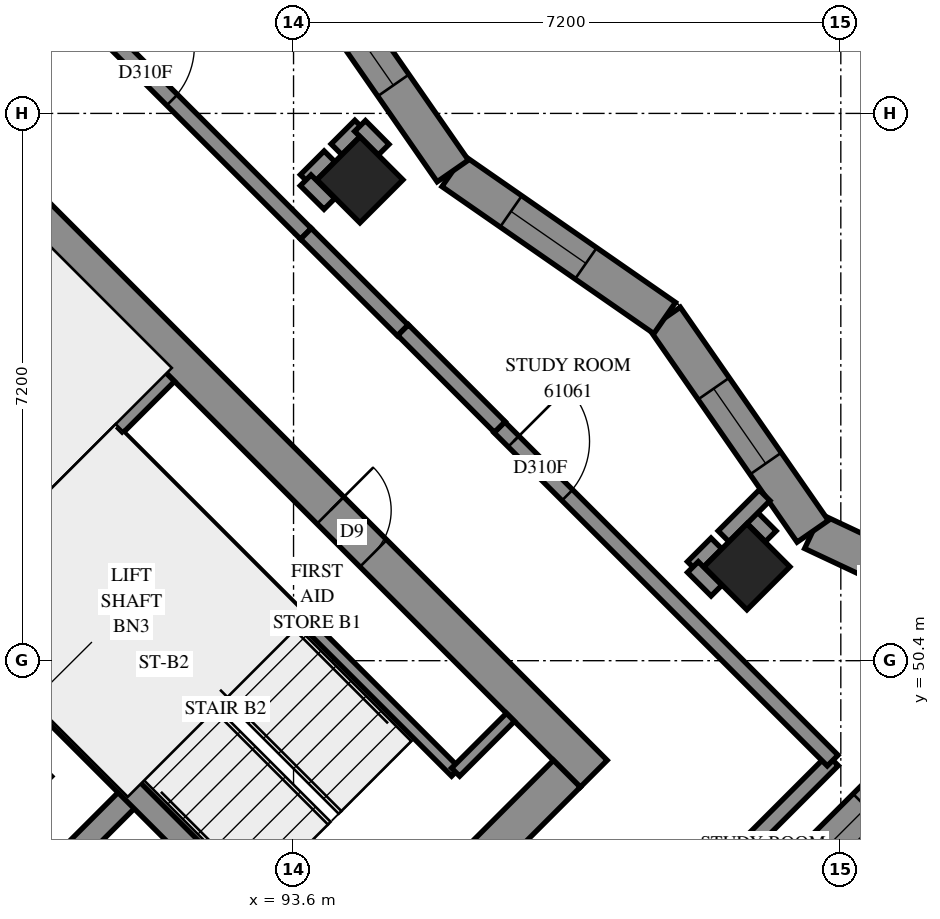
"""IFC4 building model, lengths in metres.
Left out: names, types, materials, properties, quantities, classifications, styles, units other than length and angle.
Written with IfcOpenShell. Run it as: python <this file> out.ifc"""

import sys

from ifc_helpers import new_model, si_unit, direction, frame, frame_2d, origin, origin_2d, place, context, subcontext, project, spatial, polyline, rectangle, outline, extrude, element, fill, save


model = new_model("IFC4")
c1 = context("Model", 3, precision=1e-05, world=origin(), true_north=direction((0.0, 1.0)))
c2 = subcontext(c1, "Body", "Model", "MODEL_VIEW")
j1 = project(units=[si_unit("LENGTHUNIT", "METRE"), si_unit("PLANEANGLEUNIT", "RADIAN")], contexts=[c1])
p1 = place(None, origin())
s1 = spatial("IfcSite", under=j1, at=p1, CompositionType="ELEMENT")
p2 = place(p1, origin())
s2 = spatial("IfcBuilding", under=s1, at=p2, CompositionType="ELEMENT")
p3 = place(p2, frame((0.0, 0.0, 223.6)))
s3 = spatial("IfcBuildingStorey", under=s2, at=p3, CompositionType="ELEMENT", Elevation=223.6)
for number, where, z_axis, x_axis in (
    (1, (94.474, 56.727, 0.0), (0.0, 0.0, 1.0), (0.707, -0.707, 0.0)),
    (2, (99.565, 51.635, 0.0), (0.0, 0.0, 1.0), (0.707, -0.707, 0.0)),
):
    element("IfcColumn", number, at=place(p3, frame(where, z_axis=z_axis, x_axis=x_axis)), inside=s3, PredefinedType="COLUMN", context=c2, shape_type="SweptSolid", body=[
        extrude(rectangle(XDim=0.8, YDim=0.8, at=origin_2d()), origin(), (0.0, 0.0, 1.0), 3.1),
    ])
p4 = place(p3, frame((86.66, 59.802, -0.3), z_axis=(0.0, 0.0, 1.0), x_axis=(0.7071067812, -0.7071067812, 0.0)))
e3 = element("IfcWall", 3, at=p4, inside=s3, PredefinedType="SHEAR", context=c2, shape_type="SweptSolid", body=[
    extrude(rectangle(XDim=15.4, YDim=0.5, at=frame_2d((7.7, 0.0))), origin(), (0.0, 0.0, 1.0), 2.7),
])
p5 = place(p4, frame((10.5, 0.0, 0.3)))
e4 = element("IfcOpeningElement", 4, at=p5, cuts=e3, PredefinedType="OPENING", context=c2, shape_type="SweptSolid", body=[
    extrude(rectangle(XDim=0.8, YDim=2.1, at=frame_2d((0.4, 1.05))), frame((0.0, 0.26, 0.0), z_axis=(0.0, -1.0, 0.0), x_axis=(1.0, 0.0, 0.0)), (0.0, 0.0, 1.0), 0.52),
])
p6 = place(p3, frame((87.013, 38.731, -0.3), z_axis=(0.0, 0.0, 1.0), x_axis=(0.7071067812, 0.7071067812, 0.0)))
e5 = element("IfcWall", 5, at=p6, inside=s3, PredefinedType="SHEAR", context=c2, shape_type="SweptSolid", body=[
    extrude(rectangle(XDim=14.4, YDim=0.5, at=frame_2d((7.2, 0.0))), origin(), (0.0, 0.0, 1.0), 2.7),
])
p7 = place(p6, frame((4.55, 0.0, 0.3)))
e6 = element("IfcOpeningElement", 6, at=p7, cuts=e5, PredefinedType="OPENING", context=c2, shape_type="SweptSolid", body=[
    extrude(rectangle(XDim=1.1, YDim=2.1, at=frame_2d((0.55, 1.05))), frame((0.0, 0.26, 0.0), z_axis=(0.0, -1.0, 0.0), x_axis=(1.0, 0.0, 0.0)), (0.0, 0.0, 1.0), 0.52),
])
p8 = place(p6, frame((11.35, 0.0, 0.3)))
e7 = element("IfcOpeningElement", 7, at=p8, cuts=e5, PredefinedType="OPENING", context=c2, shape_type="SweptSolid", body=[
    extrude(rectangle(XDim=1.1, YDim=2.1, at=frame_2d((0.55, 1.05))), frame((0.0, 0.26, 0.0), z_axis=(0.0, -1.0, 0.0), x_axis=(1.0, 0.0, 0.0)), (0.0, 0.0, 1.0), 0.52),
])
p9 = place(p3, frame((89.17, 46.332, 0.0), z_axis=(0.0, 0.0, 1.0), x_axis=(0.7071067812, 0.7071067812, 0.0)))
e8 = element("IfcWall", 8, at=p9, inside=s3, PredefinedType="SOLIDWALL", context=c2, shape_type="SweptSolid", body=[
    extrude(rectangle(XDim=3.3, YDim=0.3, at=frame_2d((1.65, 0.0))), origin(), (0.0, 0.0, 1.0), 3.1),
])
p10 = place(p3, frame((81.534, 53.969, 0.0), z_axis=(0.0, 0.0, 1.0), x_axis=(0.707103309, -0.7071102534, 0.0)))
e9 = element("IfcWall", 9, at=p10, inside=s3, PredefinedType="SOLIDWALL", context=c2, shape_type="SweptSolid", body=[
    extrude(rectangle(XDim=14.4, YDim=0.3, at=frame_2d((7.2, 0.0))), origin(), (0.0, 0.0, 1.0), 3.1),
])
p11 = place(p10, frame((1.25, 0.0, 0.0)))
e10 = element("IfcOpeningElement", 10, at=p11, cuts=e9, PredefinedType="OPENING", context=c2, shape_type="SweptSolid", body=[
    extrude(rectangle(XDim=1.1, YDim=2.1, at=frame_2d((0.55, 1.05))), frame((0.0, 0.16, 0.0), z_axis=(0.0, -1.0, 0.0), x_axis=(1.0, 0.0, 0.0)), (0.0, 0.0, 1.0), 0.32),
])
p12 = place(p10, frame((4.85, 0.0, 0.0)))
e11 = element("IfcOpeningElement", 11, at=p12, cuts=e9, PredefinedType="OPENING", context=c2, shape_type="SweptSolid", body=[
    extrude(rectangle(XDim=1.1, YDim=2.1, at=frame_2d((0.55, 1.05))), frame((0.0, 0.16, 0.0), z_axis=(0.0, -1.0, 0.0), x_axis=(1.0, 0.0, 0.0)), (0.0, 0.0, 1.0), 0.32),
])
p13 = place(p10, frame((8.45, 0.0, 0.0)))
e12 = element("IfcOpeningElement", 12, at=p13, cuts=e9, PredefinedType="OPENING", context=c2, shape_type="SweptSolid", body=[
    extrude(rectangle(XDim=1.1, YDim=2.1, at=frame_2d((0.55, 1.05))), frame((0.0, 0.16, 0.0), z_axis=(0.0, -1.0, 0.0), x_axis=(1.0, 0.0, 0.0)), (0.0, 0.0, 1.0), 0.32),
])
p14 = place(p10, frame((12.05, 0.0, 0.0)))
e13 = element("IfcOpeningElement", 13, at=p14, cuts=e9, PredefinedType="OPENING", context=c2, shape_type="SweptSolid", body=[
    extrude(rectangle(XDim=1.1, YDim=2.1, at=frame_2d((0.55, 1.05))), frame((0.0, 0.16, 0.0), z_axis=(0.0, -1.0, 0.0), x_axis=(1.0, 0.0, 0.0)), (0.0, 0.0, 1.0), 0.32),
])
p15 = place(p3, frame((88.958, 51.211, 0.0), z_axis=(0.0, 0.0, 1.0), x_axis=(0.7070998367, -0.7071137256, 0.0)))
e14 = element("IfcWall", 14, at=p15, inside=s3, PredefinedType="SOLIDWALL", context=c2, shape_type="SweptSolid", body=[
    extrude(rectangle(XDim=7.2, YDim=0.3, at=frame_2d((3.6, 0.0))), origin(), (0.0, 0.0, 1.0), 3.1),
])
p16 = place(p3, frame((88.958, 51.211, 0.0), z_axis=(0.0, 0.0, 1.0), x_axis=(0.7071067812, 0.7071067812, 0.0)))
e15 = element("IfcWall", 15, at=p16, inside=s3, PredefinedType="SOLIDWALL", context=c2, shape_type="SweptSolid", body=[
    extrude(rectangle(XDim=4.2, YDim=0.3, at=frame_2d((2.1, 0.0))), origin(), (0.0, 0.0, 1.0), 3.1),
])
p17 = place(p3, frame((99.211, 46.544, 0.0), z_axis=(0.0, 0.0, 1.0), x_axis=(0.7071152597, 0.7070983025, 0.0)))
e16 = element("IfcWall", 16, at=p17, inside=s3, PredefinedType="SOLIDWALL", context=c2, shape_type="SweptSolid", body=[
    extrude(outline(polyline([(0.25, -0.25), (6.253, -0.25), (5.541, 0.25), (-0.25, 0.25), (0.25, -0.25)])), origin(), (0.0, 0.0, 1.0), 3.1),
])
p18 = place(p17, frame((0.925, 0.0, 0.6)))
e17 = element("IfcOpeningElement", 17, at=p18, cuts=e16, PredefinedType="OPENING", context=c2, shape_type="SweptSolid", body=[
    extrude(rectangle(XDim=1.8, YDim=1.9, at=frame_2d((0.9, 0.95))), frame((0.0, 0.26, 0.0), z_axis=(0.0, -1.0, 0.0), x_axis=(1.0, 0.0, 0.0)), (0.0, 0.0, 1.0), 0.52),
])
p19 = place(p17, frame((3.996, 0.0, 0.6)))
e18 = element("IfcOpeningElement", 18, at=p19, cuts=e16, PredefinedType="OPENING", context=c2, shape_type="SweptSolid", body=[
    extrude(rectangle(XDim=1.2, YDim=1.9, at=frame_2d((0.6, 0.95))), frame((0.0, 0.26, 0.0), z_axis=(0.0, -1.0, 0.0), x_axis=(1.0, 0.0, 0.0)), (0.0, 0.0, 1.0), 0.52),
])
p20 = place(p3, frame((103.381, 50.714, 0.0), z_axis=(0.0, 0.0, 1.0), x_axis=(-0.9049027781, 0.4256183292, 0.0)))
e19 = element("IfcWall", 19, at=p20, inside=s3, PredefinedType="SOLIDWALL", context=c2, shape_type="SweptSolid", body=[
    extrude(outline(polyline([(-0.356, -0.25), (3.194, -0.25), (3.328, 0.25), (0.356, 0.25), (-0.356, -0.25)])), origin(), (0.0, 0.0, 1.0), 3.1),
])
p21 = place(p20, frame((1.208, 0.0, 0.45)))
e20 = element("IfcOpeningElement", 20, at=p21, cuts=e19, PredefinedType="OPENING", context=c2, shape_type="SweptSolid", body=[
    extrude(rectangle(XDim=1.2, YDim=2.5, at=frame_2d((0.6, 1.25))), frame((0.0, 0.26, 0.0), z_axis=(0.0, -1.0, 0.0), x_axis=(1.0, 0.0, 0.0)), (0.0, 0.0, 1.0), 0.52),
])
p22 = place(p3, frame((100.43, 52.102, 0.0), z_axis=(0.0, 0.0, 1.0), x_axis=(-0.5702097962, 0.8214991103, 0.0)))
e21 = element("IfcWall", 21, at=p22, inside=s3, PredefinedType="SOLIDWALL", context=c2, shape_type="SweptSolid", body=[
    extrude(outline(polyline([(0.067, -0.25), (3.461, -0.25), (3.37, 0.25), (-0.067, 0.25), (0.067, -0.25)])), origin(), (0.0, 0.0, 1.0), 3.1),
])
p23 = place(p22, frame((1.085, 0.0, 0.45)))
e22 = element("IfcOpeningElement", 22, at=p23, cuts=e21, PredefinedType="OPENING", context=c2, shape_type="SweptSolid", body=[
    extrude(rectangle(XDim=1.2, YDim=2.5, at=frame_2d((0.6, 1.25))), frame((0.0, 0.26, 0.0), z_axis=(0.0, -1.0, 0.0), x_axis=(1.0, 0.0, 0.0)), (0.0, 0.0, 1.0), 0.52),
])
p24 = place(p3, frame((98.483, 54.908, 0.0), z_axis=(0.0, 0.0, 1.0), x_axis=(-0.8215041665, 0.5702025117, 0.0)))
e23 = element("IfcWall", 23, at=p24, inside=s3, PredefinedType="SOLIDWALL", context=c2, shape_type="SweptSolid", body=[
    extrude(outline(polyline([(-0.045, -0.25), (3.348, -0.25), (3.439, 0.25), (0.045, 0.25), (-0.045, -0.25)])), origin(), (0.0, 0.0, 1.0), 3.1),
])
p25 = place(p24, frame((1.261, 0.0, 0.45)))
e24 = element("IfcOpeningElement", 24, at=p25, cuts=e23, PredefinedType="OPENING", context=c2, shape_type="SweptSolid", body=[
    extrude(rectangle(XDim=1.2, YDim=2.5, at=frame_2d((0.6, 1.25))), frame((0.0, 0.26, 0.0), z_axis=(0.0, -1.0, 0.0), x_axis=(1.0, 0.0, 0.0)), (0.0, 0.0, 1.0), 0.52),
])
p26 = place(p3, frame((95.695, 56.843, 0.0), z_axis=(0.0, 0.0, 1.0), x_axis=(-0.5702025117, 0.8215041665, 0.0)))
e25 = element("IfcWall", 25, at=p26, inside=s3, PredefinedType="SOLIDWALL", context=c2, shape_type="SweptSolid", body=[
    extrude(outline(polyline([(0.045, -0.25), (3.439, -0.25), (3.348, 0.25), (-0.045, 0.25), (0.045, -0.25)])), origin(), (0.0, 0.0, 1.0), 3.1),
])
p27 = place(p26, frame((1.371, 0.0, 0.45)))
e26 = element("IfcOpeningElement", 26, at=p27, cuts=e25, PredefinedType="OPENING", context=c2, shape_type="SweptSolid", body=[
    extrude(rectangle(XDim=1.2, YDim=2.5, at=frame_2d((0.6, 1.25))), frame((0.0, 0.26, 0.0), z_axis=(0.0, -1.0, 0.0), x_axis=(1.0, 0.0, 0.0)), (0.0, 0.0, 1.0), 0.52),
])
p28 = place(p3, frame((91.313, 53.354, 0.0), z_axis=(0.0, 0.0, 1.0), x_axis=(0.7071147811, -0.7070987812, 0.0)))
e27 = element("IfcWall", 27, at=p28, inside=s3, PredefinedType="PARTITIONING", context=c2, shape_type="SweptSolid", body=[
    extrude(rectangle(XDim=6.25, YDim=0.15, at=frame_2d((3.125, 0.0))), origin(), (0.0, 0.0, 1.0), 3.1),
])
p29 = place(p3, frame((95.732, 48.934, 0.0), z_axis=(0.0, 0.0, 1.0), x_axis=(0.7071067812, 0.7071067812, 0.0)))
e28 = element("IfcWall", 28, at=p29, inside=s3, PredefinedType="PARTITIONING", context=c2, shape_type="SweptSolid", body=[
    extrude(rectangle(XDim=1.02, YDim=0.15, at=frame_2d((0.51, 0.0))), origin(), (0.0, 0.0, 1.0), 3.1),
])
p30 = place(p3, frame((93.625, 42.021, 0.0), z_axis=(0.0, 0.0, 1.0), x_axis=(0.7071067812, 0.7071067812, 0.0)))
e29 = element("IfcWall", 29, at=p30, inside=s3, PredefinedType="PARTITIONING", context=c2, shape_type="SweptSolid", body=[
    extrude(rectangle(XDim=9.998, YDim=0.2, at=frame_2d((4.999, 0.0))), origin(), (0.0, 0.0, 1.0), 3.1),
])
p31 = place(p30, frame((0.248, 0.0, 0.0)))
e30 = element("IfcOpeningElement", 30, at=p31, cuts=e29, PredefinedType="OPENING", context=c2, shape_type="SweptSolid", body=[
    extrude(rectangle(XDim=1.0, YDim=2.1, at=frame_2d((0.5, 1.05))), frame((0.0, 0.11, 0.0), z_axis=(0.0, -1.0, 0.0), x_axis=(1.0, 0.0, 0.0)), (0.0, 0.0, 1.0), 0.22),
])
p32 = place(p3, frame((86.835, 62.945, 0.0), z_axis=(0.0, 0.0, 1.0), x_axis=(0.7071067812, -0.7071067812, 0.0)))
e31 = element("IfcWall", 31, at=p32, inside=s3, PredefinedType="PARTITIONING", context=c2, shape_type="SweptSolid", body=[
    extrude(rectangle(XDim=9.798, YDim=0.2, at=frame_2d((4.899, 0.0))), origin(), (0.0, 0.0, 1.0), 3.1),
])
p33 = place(p32, frame((6.308, 0.0, 0.0)))
e32 = element("IfcOpeningElement", 32, at=p33, cuts=e31, PredefinedType="OPENING", context=c2, shape_type="SweptSolid", body=[
    extrude(rectangle(XDim=1.0, YDim=2.1, at=frame_2d((0.5, 1.05))), frame((0.0, 0.11, 0.0), z_axis=(0.0, -1.0, 0.0), x_axis=(1.0, 0.0, 0.0)), (0.0, 0.0, 1.0), 0.22),
])
p34 = place(p3, frame((96.309, 53.471, 0.0), z_axis=(0.0, 0.0, 1.0), x_axis=(0.7071067812, -0.7071067812, 0.0)))
e33 = element("IfcWall", 33, at=p34, inside=s3, PredefinedType="PARTITIONING", context=c2, shape_type="SweptSolid", body=[
    extrude(rectangle(XDim=6.2, YDim=0.2, at=frame_2d((3.1, 0.0))), origin(), (0.0, 0.0, 1.0), 3.1),
])
p35 = place(p34, frame((0.263, 0.0, 0.0)))
e34 = element("IfcOpeningElement", 34, at=p35, cuts=e33, PredefinedType="OPENING", context=c2, shape_type="SweptSolid", body=[
    extrude(rectangle(XDim=1.0, YDim=2.1, at=frame_2d((0.5, 1.05))), frame((0.0, 0.11, 0.0), z_axis=(0.0, -1.0, 0.0), x_axis=(1.0, 0.0, 0.0)), (0.0, 0.0, 1.0), 0.22),
])
for number, where, z_axis, x_axis in (
    (35, (93.763, 56.017, 0.0), (0.0, 0.0, 1.0), (0.708, -0.707, 0.0)),
    (36, (95.041, 54.749, 0.0), (0.0, 0.0, 1.0), (0.707, -0.708, 0.0)),
):
    element("IfcWall", number, at=place(p3, frame(where, z_axis=z_axis, x_axis=x_axis)), inside=s3, PredefinedType="PARTITIONING", context=c2, shape_type="SweptSolid", body=[
        extrude(rectangle(XDim=1.8, YDim=0.2, at=frame_2d((0.9, 0.0))), origin(), (0.0, 0.0, 1.0), 3.1),
    ])
for number, where, z_axis, x_axis in (
    (37, (93.761, 56.723, 0.0), (0.0, 0.0, 1.0), (0.707, 0.707, 0.0)),
    (38, (94.165, 57.127, 0.0), (0.0, 0.0, 1.0), (0.707, 0.707, 0.0)),
):
    element("IfcWall", number, at=place(p3, frame(where, z_axis=z_axis, x_axis=x_axis)), inside=s3, PredefinedType="PARTITIONING", context=c2, shape_type="SweptSolid", body=[
        extrude(rectangle(XDim=0.441, YDim=0.2, at=frame_2d((0.221, 0.0))), origin(), (0.0, 0.0, 1.0), 3.1),
    ])
for number, where, z_axis, x_axis in (
    (39, (94.475, 57.435, 0.0), (0.0, 0.0, 1.0), (0.705, -0.709, 0.0)),
    (40, (93.76, 56.719, 0.0), (0.0, 0.0, 1.0), (0.709, -0.705, 0.0)),
):
    element("IfcWall", number, at=place(p3, frame(where, z_axis=z_axis, x_axis=x_axis)), inside=s3, PredefinedType="PARTITIONING", context=c2, shape_type="SweptSolid", body=[
        extrude(rectangle(XDim=0.44, YDim=0.2, at=frame_2d((0.22, 0.0))), origin(), (0.0, 0.0, 1.0), 3.1),
    ])
for number, where, z_axis, x_axis in (
    (41, (98.853, 51.633, 0.0), (0.0, 0.0, 1.0), (0.707, 0.707, 0.0)),
    (42, (98.854, 51.632, 0.0), (0.0, 0.0, 1.0), (0.707, -0.707, 0.0)),
    (43, (99.568, 52.346, 0.0), (0.0, 0.0, 1.0), (0.707, -0.707, 0.0)),
):
    element("IfcWall", number, at=place(p3, frame(where, z_axis=z_axis, x_axis=x_axis)), inside=s3, PredefinedType="PARTITIONING", context=c2, shape_type="SweptSolid", body=[
        extrude(rectangle(XDim=0.438, YDim=0.2, at=frame_2d((0.219, 0.0))), origin(), (0.0, 0.0, 1.0), 3.1),
    ])
p36 = place(p3, frame((99.257, 52.037, 0.0), z_axis=(0.0, 0.0, 1.0), x_axis=(0.7071067812, 0.7071067812, 0.0)))
e44 = element("IfcWall", 44, at=p36, inside=s3, PredefinedType="PARTITIONING", context=c2, shape_type="SweptSolid", body=[
    extrude(rectangle(XDim=0.763, YDim=0.2, at=frame_2d((0.382, 0.0))), origin(), (0.0, 0.0, 1.0), 3.1),
])
p37 = place(p18, origin())
e45 = element("IfcWindow", 45, at=p37, inside=s3, PartitioningType="SINGLE_PANEL", PredefinedType="WINDOW", context=c2, shape_type="SweptSolid", body=[
    extrude(rectangle(XDim=1.8, YDim=1.9, at=frame_2d((0.9, 0.95))), frame((0.0, 0.18, 0.0), z_axis=(0.0, -1.0, 0.0), x_axis=(1.0, 0.0, 0.0)), (0.0, 0.0, 1.0), 0.06),
])
fill(e17, e45)
p38 = place(p23, origin())
e46 = element("IfcWindow", 46, at=p38, inside=s3, PartitioningType="SINGLE_PANEL", PredefinedType="WINDOW", context=c2, shape_type="SweptSolid", body=[
    extrude(rectangle(XDim=1.2, YDim=2.5, at=frame_2d((0.6, 1.25))), frame((0.0, 0.18, 0.0), z_axis=(0.0, -1.0, 0.0), x_axis=(1.0, 0.0, 0.0)), (0.0, 0.0, 1.0), 0.06),
])
fill(e22, e46)
p39 = place(p25, origin())
e47 = element("IfcWindow", 47, at=p39, inside=s3, PartitioningType="SINGLE_PANEL", PredefinedType="WINDOW", context=c2, shape_type="SweptSolid", body=[
    extrude(rectangle(XDim=1.2, YDim=2.5, at=frame_2d((0.6, 1.25))), frame((0.0, 0.18, 0.0), z_axis=(0.0, -1.0, 0.0), x_axis=(1.0, 0.0, 0.0)), (0.0, 0.0, 1.0), 0.06),
])
fill(e24, e47)
p40 = place(p27, origin())
e48 = element("IfcWindow", 48, at=p40, inside=s3, PartitioningType="SINGLE_PANEL", PredefinedType="WINDOW", context=c2, shape_type="SweptSolid", body=[
    extrude(rectangle(XDim=1.2, YDim=2.5, at=frame_2d((0.6, 1.25))), frame((0.0, 0.18, 0.0), z_axis=(0.0, -1.0, 0.0), x_axis=(1.0, 0.0, 0.0)), (0.0, 0.0, 1.0), 0.06),
])
fill(e26, e48)
p41 = place(p5, origin())
e49 = element("IfcDoor", 49, at=p41, inside=s3, OperationType="SINGLE_SWING_RIGHT", PredefinedType="DOOR", context=c2, shape_type="SweptSolid", body=[
    extrude(rectangle(XDim=0.8, YDim=2.1, at=frame_2d((0.4, 1.05))), frame((0.0, 0.025, 0.0), z_axis=(0.0, -1.0, 0.0), x_axis=(1.0, 0.0, 0.0)), (0.0, 0.0, 1.0), 0.05),
])
fill(e4, e49)
p42 = place(p33, origin())
e50 = element("IfcDoor", 50, at=p42, inside=s3, OperationType="SINGLE_SWING_LEFT", PredefinedType="DOOR", context=c2, shape_type="SweptSolid", body=[
    extrude(rectangle(XDim=1.0, YDim=2.1, at=frame_2d((0.5, 1.05))), frame((0.0, 0.025, 0.0), z_axis=(0.0, -1.0, 0.0), x_axis=(1.0, 0.0, 0.0)), (0.0, 0.0, 1.0), 0.05),
])
fill(e32, e50)
p43 = place(p35, origin())
e51 = element("IfcDoor", 51, at=p43, inside=s3, OperationType="SINGLE_SWING_LEFT", PredefinedType="DOOR", context=c2, shape_type="SweptSolid", body=[
    extrude(rectangle(XDim=1.0, YDim=2.1, at=frame_2d((0.5, 1.05))), frame((0.0, 0.025, 0.0), z_axis=(0.0, -1.0, 0.0), x_axis=(1.0, 0.0, 0.0)), (0.0, 0.0, 1.0), 0.05),
])
fill(e34, e51)
save(model, sys.argv[1])
